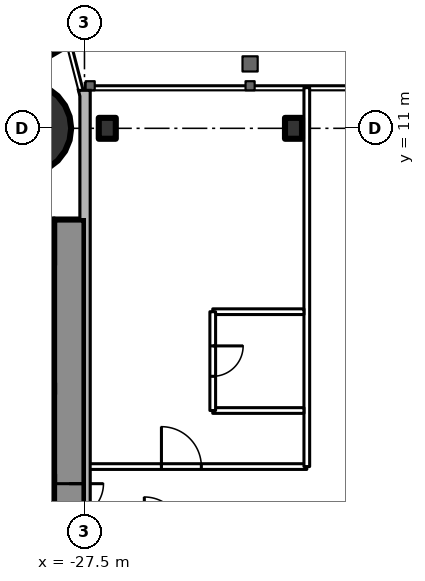
"""IFC4 building model, lengths in metres.
Left out: names, types, materials, properties, quantities, classifications, styles, units other than length and angle.
Written with IfcOpenShell. Run it as: python <this file> out.ifc"""

import sys

from ifc_helpers import new_model, si_unit, direction, frame, frame_2d, origin, origin_2d, place, context, subcontext, project, spatial, rectangle, circle, i_section, extrude, element, fill, save


model = new_model("IFC4")
c1 = context("Model", 3, precision=1e-05, world=origin(), true_north=direction((0.0, 1.0)))
c2 = subcontext(c1, "Body", "Model", "MODEL_VIEW")
j1 = project(units=[si_unit("LENGTHUNIT", "METRE"), si_unit("PLANEANGLEUNIT", "RADIAN")], contexts=[c1])
p1 = place(None, origin())
s1 = spatial("IfcSite", under=j1, at=p1, CompositionType="ELEMENT")
p2 = place(p1, origin())
s2 = spatial("IfcBuilding", under=s1, at=p2, CompositionType="ELEMENT")
p3 = place(p2, frame((0.0, 0.0, 244.1)))
s3 = spatial("IfcBuildingStorey", under=s2, at=p3, CompositionType="ELEMENT", Elevation=244.1)
p4 = place(p3, frame((-29.05, 11.0, 0.0), z_axis=(0.0, 0.0, 1.0), x_axis=(1.0, 0.0, 0.0)))
e1 = element("IfcColumn", 1, at=p4, inside=s3, PredefinedType="COLUMN", context=c2, shape_type="SweptSolid", body=[
    extrude(circle(Radius=1.2, at=origin_2d()), origin(), (0.0, 0.0, 1.0), 3.6),
])
p5 = place(p3, frame((-27.9, 8.6, 0.0), z_axis=(0.0, 0.0, 1.0), x_axis=(0.0, -1.0, 0.0)))
e2 = element("IfcWall", 2, at=p5, inside=s3, PredefinedType="SHEAR", context=c2, shape_type="SweptSolid", body=[
    extrude(rectangle(XDim=17.2, YDim=0.8, at=frame_2d((8.6, 0.0))), origin(), (0.0, 0.0, 1.0), 3.6),
])
p6 = place(p5, frame((6.95, 0.0, 0.0)))
e3 = element("IfcOpeningElement", 3, at=p6, cuts=e2, PredefinedType="OPENING", context=c2, shape_type="SweptSolid", body=[
    extrude(rectangle(XDim=0.9, YDim=2.2, at=frame_2d((0.45, 1.1))), frame((0.0, 0.41, 0.0), z_axis=(0.0, -1.0, 0.0), x_axis=(1.0, 0.0, 0.0)), (0.0, 0.0, 1.0), 0.82),
])
p7 = place(p3, frame((-28.3, 8.0, 0.0), z_axis=(0.0, 0.0, 1.0), x_axis=(-1.0, 0.0, 0.0)))
e4 = element("IfcWall", 4, at=p7, inside=s3, PredefinedType="SHEAR", context=c2, shape_type="SweptSolid", body=[
    extrude(rectangle(XDim=8.4, YDim=1.2, at=frame_2d((4.2, 0.0))), origin(), (0.0, 0.0, 1.0), 3.6),
])
p8 = place(p7, frame((0.25, 0.0, 0.0)))
e5 = element("IfcOpeningElement", 5, at=p8, cuts=e4, PredefinedType="OPENING", context=c2, shape_type="SweptSolid", body=[
    extrude(rectangle(XDim=1.0, YDim=2.2, at=frame_2d((0.5, 1.1))), frame((0.0, 0.61, 0.0), z_axis=(0.0, -1.0, 0.0), x_axis=(1.0, 0.0, 0.0)), (0.0, 0.0, 1.0), 1.22),
])
p9 = place(p3, frame((-28.3, 4.15, 0.0), z_axis=(0.0, 0.0, 1.0), x_axis=(-1.0, 0.0, 0.0)))
e6 = element("IfcWall", 6, at=p9, inside=s3, PredefinedType="SHEAR", context=c2, shape_type="SweptSolid", body=[
    extrude(rectangle(XDim=8.4, YDim=0.3, at=frame_2d((4.2, 0.0))), origin(), (0.0, 0.0, 1.0), 3.6),
])
p10 = place(p3, frame((-28.3, 1.775, 0.0), z_axis=(0.0, 0.0, 1.0), x_axis=(-1.0, 0.0, 0.0)))
e7 = element("IfcWall", 7, at=p10, inside=s3, PredefinedType="SHEAR", context=c2, shape_type="SweptSolid", body=[
    extrude(rectangle(XDim=2.9, YDim=0.25, at=frame_2d((1.45, 0.0))), origin(), (0.0, 0.0, 1.0), 3.6),
])
p11 = place(p3, frame((-27.2, 14.3, 0.0), z_axis=(0.0, 0.0, 1.0), x_axis=(-0.866026593062, -0.499997940104, 0.0)))
e8 = element("IfcWall", 8, at=p11, inside=s3, PredefinedType="SHEAR", context=c2, shape_type="SweptSolid", body=[
    extrude(rectangle(XDim=28.946, YDim=1.2, at=frame_2d((14.473, 0.0))), origin(), (0.0, 0.0, 1.0), 3.6),
])
p12 = place(p11, frame((4.6, 0.0, 0.0)))
e9 = element("IfcOpeningElement", 9, at=p12, cuts=e8, PredefinedType="OPENING", context=c2, shape_type="SweptSolid", body=[
    extrude(rectangle(XDim=1.0, YDim=2.2, at=frame_2d((0.5, 1.1))), frame((0.0, 0.61, 0.0), z_axis=(0.0, -1.0, 0.0), x_axis=(1.0, 0.0, 0.0)), (0.0, 0.0, 1.0), 1.22),
])
p13 = place(p11, frame((13.395, 0.0, 0.0)))
e10 = element("IfcOpeningElement", 10, at=p13, cuts=e8, PredefinedType="OPENING", context=c2, shape_type="SweptSolid", body=[
    extrude(rectangle(XDim=1.8, YDim=2.2, at=frame_2d((0.9, 1.1))), frame((0.0, 0.61, 0.0), z_axis=(0.0, -1.0, 0.0), x_axis=(1.0, 0.0, 0.0)), (0.0, 0.0, 1.0), 1.22),
])
for number, where, z_axis, x_axis in (
    (11, (-26.9, 11.0, 0.0), (0.0, 0.0, 1.0), (1.0, 0.0, 0.0)),
    (12, (-22.0, 11.0, 0.0), (0.0, 0.0, 1.0), (1.0, 0.0, 0.0)),
):
    element("IfcColumn", number, at=place(p3, frame(where, z_axis=z_axis, x_axis=x_axis)), inside=s3, PredefinedType="COLUMN", context=c2, shape_type="SweptSolid", body=[
        extrude(i_section(OverallWidth=0.448, OverallDepth=0.55, WebThickness=0.072, FlangeThickness=0.115, FilletRadius=0.02, at=origin_2d()), origin(), (0.0, 0.0, 1.0), 3.6),
    ])
p14 = place(p3, frame((-27.5, 2.1, 0.0), z_axis=(0.0, 0.0, 1.0), x_axis=(1.0, 0.0, 0.0)))
e13 = element("IfcWall", 13, at=p14, inside=s3, PredefinedType="PARTITIONING", context=c2, shape_type="SweptSolid", body=[
    extrude(rectangle(XDim=5.85, YDim=0.15, at=frame_2d((2.925, 0.0))), origin(), (0.0, 0.0, 1.0), 3.4),
])
p15 = place(p14, frame((2.025, 0.0, 0.0)))
e14 = element("IfcOpeningElement", 14, at=p15, cuts=e13, PredefinedType="OPENING", context=c2, shape_type="SweptSolid", body=[
    extrude(rectangle(XDim=1.05, YDim=2.4, at=frame_2d((0.525, 1.2))), frame((0.0, 0.085, 0.0), z_axis=(0.0, -1.0, 0.0), x_axis=(1.0, 0.0, 0.0)), (0.0, 0.0, 1.0), 0.17),
])
p16 = place(p3, frame((-21.65, 2.1, 0.0), z_axis=(0.0, 0.0, 1.0), x_axis=(0.0, 1.0, 0.0)))
e15 = element("IfcWall", 15, at=p16, inside=s3, PredefinedType="PARTITIONING", context=c2, shape_type="SweptSolid", body=[
    extrude(rectangle(XDim=9.97, YDim=0.15, at=frame_2d((4.985, 0.0))), origin(), (0.0, 0.0, 1.0), 3.4),
])
for number, where, z_axis, x_axis in (
    (16, (-24.125, 6.175, 0.0), (0.0, 0.0, 1.0), (1.0, 0.0, 0.0)),
    (17, (-24.125, 3.575, 0.0), (0.0, 0.0, 1.0), (1.0, 0.0, 0.0)),
):
    element("IfcWall", number, at=place(p3, frame(where, z_axis=z_axis, x_axis=x_axis)), inside=s3, PredefinedType="PARTITIONING", context=c2, shape_type="SweptSolid", body=[
        extrude(rectangle(XDim=2.4, YDim=0.15, at=frame_2d((1.2, 0.0))), origin(), (0.0, 0.0, 1.0), 3.4),
    ])
p17 = place(p3, frame((-24.125, 3.575, 0.0), z_axis=(0.0, 0.0, 1.0), x_axis=(0.0, 1.0, 0.0)))
e18 = element("IfcWall", 18, at=p17, inside=s3, PredefinedType="PARTITIONING", context=c2, shape_type="SweptSolid", body=[
    extrude(rectangle(XDim=2.6, YDim=0.15, at=frame_2d((1.3, 0.0))), origin(), (0.0, 0.0, 1.0), 3.4),
])
p18 = place(p17, frame((0.9, 0.0, 0.0)))
e19 = element("IfcOpeningElement", 19, at=p18, cuts=e18, PredefinedType="OPENING", context=c2, shape_type="SweptSolid", body=[
    extrude(rectangle(XDim=0.8, YDim=2.2, at=frame_2d((0.4, 1.1))), frame((0.0, 0.085, 0.0), z_axis=(0.0, -1.0, 0.0), x_axis=(1.0, 0.0, 0.0)), (0.0, 0.0, 1.0), 0.17),
])
p19 = place(p6, origin())
e20 = element("IfcDoor", 20, at=p19, inside=s3, OperationType="SINGLE_SWING_LEFT", PredefinedType="DOOR", context=c2, shape_type="SweptSolid", body=[
    extrude(rectangle(XDim=0.9, YDim=2.2, at=frame_2d((0.45, 1.1))), frame((0.0, 0.025, 0.0), z_axis=(0.0, -1.0, 0.0), x_axis=(1.0, 0.0, 0.0)), (0.0, 0.0, 1.0), 0.05),
])
fill(e3, e20)
p20 = place(p18, origin())
e21 = element("IfcDoor", 21, at=p20, inside=s3, OperationType="SINGLE_SWING_RIGHT", PredefinedType="DOOR", context=c2, shape_type="SweptSolid", body=[
    extrude(rectangle(XDim=0.8, YDim=2.2, at=frame_2d((0.4, 1.1))), frame((0.0, 0.025, 0.0), z_axis=(0.0, -1.0, 0.0), x_axis=(1.0, 0.0, 0.0)), (0.0, 0.0, 1.0), 0.05),
])
fill(e19, e21)
p21 = place(p15, origin())
e22 = element("IfcDoor", 22, at=p21, inside=s3, OperationType="SINGLE_SWING_LEFT", PredefinedType="DOOR", context=c2, shape_type="SweptSolid", body=[
    extrude(rectangle(XDim=1.05, YDim=2.4, at=frame_2d((0.525, 1.2))), frame((0.0, 0.025, 0.0), z_axis=(0.0, -1.0, 0.0), x_axis=(1.0, 0.0, 0.0)), (0.0, 0.0, 1.0), 0.05),
])
fill(e14, e22)
save(model, sys.argv[1])
